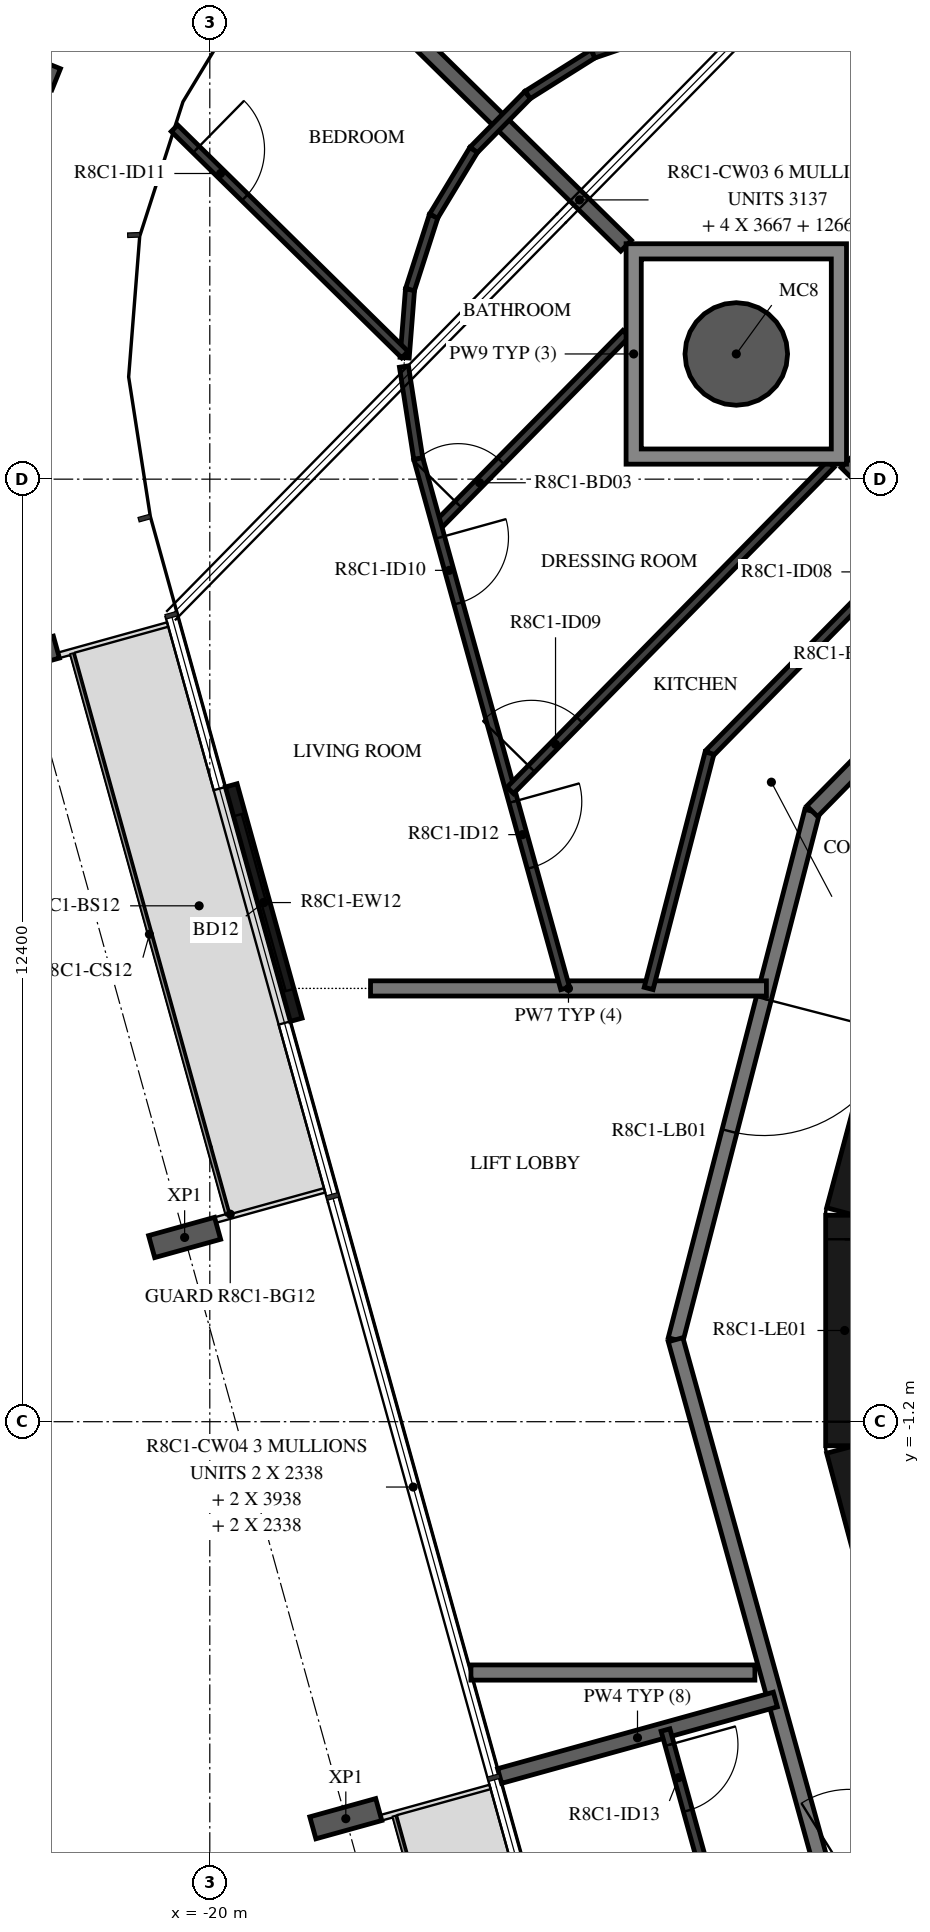
"""IFC4 building model, lengths in metres.
Left out: names, types, materials, properties, quantities, classifications, styles, units other than length and angle.
Written with IfcOpenShell. Run it as: python <this file> out.ifc"""

import sys

from ifc_helpers import new_model, si_unit, direction, frame, frame_2d, origin, origin_2d, place, context, subcontext, project, spatial, polyline, rectangle, hollow_circle, i_section, outline, extrude, element, fill, save


model = new_model("IFC4")
c1 = context("Model", 3, precision=1e-05, world=origin(), true_north=direction((0.0, 1.0)))
c2 = subcontext(c1, "Body", "Model", "MODEL_VIEW")
j1 = project(units=[si_unit("LENGTHUNIT", "METRE"), si_unit("PLANEANGLEUNIT", "RADIAN")], contexts=[c1])
p1 = place(None, origin())
s1 = spatial("IfcSite", under=j1, at=p1, CompositionType="ELEMENT")
p2 = place(p1, origin())
s2 = spatial("IfcBuilding", under=s1, at=p2, CompositionType="ELEMENT")
p3 = place(p2, frame((0.0, 0.0, 322.7)))
s3 = spatial("IfcBuildingStorey", under=s2, at=p3, CompositionType="ELEMENT", Elevation=322.7)
p4 = place(p3, frame((-13.073, 12.847, -0.38), z_axis=(0.0, 0.0, 1.0), x_axis=(1.0, 0.0, 0.0)))
e1 = element("IfcColumn", 1, at=p4, inside=s3, PredefinedType="COLUMN", context=c2, shape_type="SweptSolid", body=[
    extrude(hollow_circle(Radius=0.675, WallThickness=0.03, at=origin_2d()), origin(), (0.0, 0.0, 1.0), 2.616),
])
for number, where, z_axis, x_axis in (
    (2, (-22.438, 16.629, -0.38), (0.0, 0.0, 1.0), (0.374, 0.927, 0.0)),
    (3, (-22.452, 8.87, -0.38), (0.0, 0.0, 1.0), (-0.267, 0.964, 0.0)),
    (4, (-20.331, 1.224, -0.38), (0.0, 0.0, 1.0), (-0.267, 0.964, 0.0)),
    (5, (-18.211, -6.423, -0.38), (0.0, 0.0, 1.0), (-0.267, 0.964, 0.0)),
):
    element("IfcColumn", number, at=place(p3, frame(where, z_axis=z_axis, x_axis=x_axis)), inside=s3, PredefinedType="COLUMN", context=c2, shape_type="SweptSolid", body=[
        extrude(i_section(OverallWidth=0.3, OverallDepth=0.9, WebThickness=0.019, FlangeThickness=0.035, FilletRadius=0.03, at=origin_2d()), origin(), (0.0, 0.0, 1.0), 2.616),
    ])
p5 = place(p3, frame((-19.718, 7.171, 0.0), z_axis=(0.0, 0.0, 1.0), x_axis=(0.267266077957, -0.963622770369, 0.0)))
e6 = element("IfcWall", 6, at=p5, inside=s3, PredefinedType="STANDARD", context=c2, shape_type="SweptSolid", body=[
    extrude(rectangle(XDim=3.2, YDim=0.16, at=frame_2d((1.6, 0.0))), origin(), (0.0, 0.0, 1.0), 3.05),
])
p6 = place(p5, frame((0.4, 0.0, 0.0)))
e7 = element("IfcOpeningElement", 7, at=p6, cuts=e6, PredefinedType="OPENING", context=c2, shape_type="SweptSolid", body=[
    extrude(rectangle(XDim=2.4, YDim=2.4, at=frame_2d((1.2, 1.2))), frame((0.0, 0.09, 0.0), z_axis=(0.0, -1.0, 0.0), x_axis=(1.0, 0.0, 0.0)), (0.0, 0.0, 1.0), 0.18),
])
p7 = place(p3, frame((-10.858, 4.479, 0.0), z_axis=(0.0, 0.0, 1.0), x_axis=(-0.258734743916, -0.965948410781, 0.0)))
e8 = element("IfcWall", 8, at=p7, inside=s3, PredefinedType="SHEAR", context=c2, shape_type="SweptSolid", body=[
    extrude(rectangle(XDim=3.033, YDim=0.5, at=frame_2d((1.516, 0.0))), origin(), (0.0, 0.0, 1.0), 3.05),
])
p8 = place(p3, frame((-11.647, 1.516, 0.0), z_axis=(0.0, 0.0, 1.0), x_axis=(0.0, -1.0, 0.0)))
e9 = element("IfcWall", 9, at=p8, inside=s3, PredefinedType="SHEAR", context=c2, shape_type="SweptSolid", body=[
    extrude(rectangle(XDim=3.033, YDim=0.5, at=frame_2d((1.516, 0.0))), origin(), (0.0, 0.0, 1.0), 3.05),
])
p9 = place(p8, frame((0.316, 0.0, 0.0)))
e10 = element("IfcOpeningElement", 10, at=p9, cuts=e9, PredefinedType="OPENING", context=c2, shape_type="SweptSolid", body=[
    extrude(rectangle(XDim=2.4, YDim=2.1, at=frame_2d((1.2, 1.05))), frame((0.0, 0.26, 0.0), z_axis=(0.0, -1.0, 0.0), x_axis=(1.0, 0.0, 0.0)), (0.0, 0.0, 1.0), 0.52),
])
p10 = place(p3, frame((-11.643, -1.55, 0.0), z_axis=(0.0, 0.0, 1.0), x_axis=(0.258734743916, -0.965948410781, 0.0)))
e11 = element("IfcWall", 11, at=p10, inside=s3, PredefinedType="SHEAR", context=c2, shape_type="SweptSolid", body=[
    extrude(rectangle(XDim=3.033, YDim=0.5, at=frame_2d((1.516, 0.0))), origin(), (0.0, 0.0, 1.0), 3.05),
])
p11 = place(p10, frame((1.066, 0.0, 0.0)))
e12 = element("IfcOpeningElement", 12, at=p11, cuts=e11, PredefinedType="OPENING", context=c2, shape_type="SweptSolid", body=[
    extrude(rectangle(XDim=0.9, YDim=2.1, at=frame_2d((0.45, 1.05))), frame((0.0, 0.26, 0.0), z_axis=(0.0, -1.0, 0.0), x_axis=(1.0, 0.0, 0.0)), (0.0, 0.0, 1.0), 0.52),
])
p12 = place(p3, frame((-11.687, -7.303, 0.0), z_axis=(0.0, 0.0, 1.0), x_axis=(0.848064094072, 0.529893661357, 0.0)))
e13 = element("IfcWall", 13, at=p12, inside=s3, PredefinedType="PARTITIONING", context=c2, shape_type="SweptSolid", body=[
    extrude(rectangle(XDim=1.876, YDim=0.12, at=frame_2d((0.938, 0.0))), origin(), (0.0, 0.0, 1.0), 3.05),
])
p13 = place(p12, frame((0.125, 0.0, 0.0)))
e14 = element("IfcOpeningElement", 14, at=p13, cuts=e13, PredefinedType="OPENING", context=c2, shape_type="SweptSolid", body=[
    extrude(rectangle(XDim=1.2, YDim=2.1, at=frame_2d((0.6, 1.05))), frame((0.0, 0.07, 0.0), z_axis=(0.0, -1.0, 0.0), x_axis=(1.0, 0.0, 0.0)), (0.0, 0.0, 1.0), 0.14),
])
p14 = place(p3, frame((-12.074, 6.831, 0.0), z_axis=(0.0, 0.0, 1.0), x_axis=(-0.250391063186, -0.968144780225, 0.0)))
e15 = element("IfcWall", 15, at=p14, inside=s3, PredefinedType="STANDARD", context=c2, shape_type="SweptSolid", body=[
    extrude(rectangle(XDim=7.181, YDim=0.2, at=frame_2d((3.591, 0.0))), origin(), (0.0, 0.0, 1.0), 3.05),
])
p15 = place(p14, frame((2.548, 0.0, 0.0)))
e16 = element("IfcOpeningElement", 16, at=p15, cuts=e15, PredefinedType="OPENING", context=c2, shape_type="SweptSolid", body=[
    extrude(rectangle(XDim=1.8, YDim=2.1, at=frame_2d((0.9, 1.05))), frame((0.0, 0.11, 0.0), z_axis=(0.0, -1.0, 0.0), x_axis=(1.0, 0.0, 0.0)), (0.0, 0.0, 1.0), 0.22),
])
p16 = place(p3, frame((-13.872, -0.121, 0.0), z_axis=(0.0, 0.0, 1.0), x_axis=(0.267254575108, -0.963625960674, 0.0)))
e17 = element("IfcWall", 17, at=p16, inside=s3, PredefinedType="STANDARD", context=c2, shape_type="SweptSolid", body=[
    extrude(rectangle(XDim=7.181, YDim=0.2, at=frame_2d((3.591, 0.0))), origin(), (0.0, 0.0, 1.0), 3.05),
])
p17 = place(p3, frame((-7.041, 11.953, 0.0), z_axis=(0.0, 0.0, 1.0), x_axis=(-0.70090916255, -0.713250549143, 0.0)))
e18 = element("IfcWall", 18, at=p17, inside=s3, PredefinedType="STANDARD", context=c2, shape_type="SweptSolid", body=[
    extrude(rectangle(XDim=7.181, YDim=0.2, at=frame_2d((3.59, 0.0))), origin(), (0.0, 0.0, 1.0), 3.05),
])
p18 = place(p17, frame((2.39, 0.0, 0.0)))
e19 = element("IfcOpeningElement", 19, at=p18, cuts=e18, PredefinedType="OPENING", context=c2, shape_type="SweptSolid", body=[
    extrude(rectangle(XDim=1.0, YDim=2.1, at=frame_2d((0.5, 1.05))), frame((0.0, 0.11, 0.0), z_axis=(0.0, -1.0, 0.0), x_axis=(1.0, 0.0, 0.0)), (0.0, 0.0, 1.0), 0.22),
])
p19 = place(p17, frame((3.791, 0.0, 0.0)))
e20 = element("IfcOpeningElement", 20, at=p19, cuts=e18, PredefinedType="OPENING", context=c2, shape_type="SweptSolid", body=[
    extrude(rectangle(XDim=1.0, YDim=2.1, at=frame_2d((0.5, 1.05))), frame((0.0, 0.11, 0.0), z_axis=(0.0, -1.0, 0.0), x_axis=(1.0, 0.0, 0.0)), (0.0, 0.0, 1.0), 0.22),
])
p20 = place(p3, frame((-12.677, 4.5, 0.0), z_axis=(0.0, 0.0, 1.0), x_axis=(-1.0, 0.0, 0.0)))
e21 = element("IfcWall", 21, at=p20, inside=s3, PredefinedType="STANDARD", context=c2, shape_type="SweptSolid", body=[
    extrude(rectangle(XDim=5.208, YDim=0.2, at=frame_2d((2.604, 0.0))), origin(), (0.0, 0.0, 1.0), 3.05),
])
p21 = place(p3, frame((-16.564, -4.5, 0.0), z_axis=(0.0, 0.0, 1.0), x_axis=(1.0, 0.0, 0.0)))
e22 = element("IfcWall", 22, at=p21, inside=s3, PredefinedType="STANDARD", context=c2, shape_type="SweptSolid", body=[
    extrude(rectangle(XDim=3.736, YDim=0.2, at=frame_2d((1.868, 0.0))), origin(), (0.0, 0.0, 1.0), 3.05),
])
p22 = place(p3, frame((-11.623, 11.422, 0.0), z_axis=(0.0, 0.0, 1.0), x_axis=(0.713233657229, -0.700926351478, 0.0)))
e23 = element("IfcWall", 23, at=p22, inside=s3, PredefinedType="STANDARD", context=c2, shape_type="SweptSolid", body=[
    extrude(rectangle(XDim=2.896, YDim=0.2, at=frame_2d((1.448, 0.0))), origin(), (0.0, 0.0, 1.0), 3.05),
])
p23 = place(p3, frame((-18.741, 18.417, 0.0), z_axis=(0.0, 0.0, 1.0), x_axis=(0.713252414586, -0.700907264256, 0.0)))
e24 = element("IfcWall", 24, at=p23, inside=s3, PredefinedType="STANDARD", context=c2, shape_type="SweptSolid", body=[
    extrude(rectangle(XDim=5.913, YDim=0.2, at=frame_2d((2.957, 0.0))), origin(), (0.0, 0.0, 1.0), 3.05),
])
p24 = place(p3, frame((-16.187, -5.862, 0.0), z_axis=(0.0, 0.0, 1.0), x_axis=(0.963631166683, 0.267235803358, 0.0)))
e25 = element("IfcWall", 25, at=p24, inside=s3, PredefinedType="STANDARD", context=c2, shape_type="SweptSolid", body=[
    extrude(rectangle(XDim=3.765, YDim=0.2, at=frame_2d((1.882, 0.0))), origin(), (0.0, 0.0, 1.0), 3.05),
])
p25 = place(p3, frame((-8.413, 12.698, 0.0), z_axis=(0.0, 0.0, 1.0), x_axis=(-0.700901588882, -0.713257991686, 0.0)))
e26 = element("IfcWall", 26, at=p25, inside=s3, PredefinedType="PARTITIONING", context=c2, shape_type="SweptSolid", body=[
    extrude(rectangle(XDim=7.153, YDim=0.12, at=frame_2d((3.576, 0.0))), origin(), (0.0, 0.0, 1.0), 3.05),
])
p26 = place(p25, frame((3.36, 0.0, 0.0)))
e27 = element("IfcOpeningElement", 27, at=p26, cuts=e26, PredefinedType="OPENING", context=c2, shape_type="SweptSolid", body=[
    extrude(rectangle(XDim=0.9, YDim=2.1, at=frame_2d((0.45, 1.05))), frame((0.0, 0.07, 0.0), z_axis=(0.0, -1.0, 0.0), x_axis=(1.0, 0.0, 0.0)), (0.0, 0.0, 1.0), 0.14),
])
p27 = place(p3, frame((-11.769, 17.054, 0.0), z_axis=(0.0, 0.0, 1.0), x_axis=(0.968146475492, -0.250384508293, 0.0)))
e28 = element("IfcWall", 28, at=p27, inside=s3, PredefinedType="PARTITIONING", context=c2, shape_type="SweptSolid", body=[
    extrude(rectangle(XDim=9.359, YDim=0.12, at=frame_2d((4.679, 0.0))), origin(), (0.0, 0.0, 1.0), 3.05),
])
p28 = place(p27, frame((1.276, 0.0, 0.0)))
e29 = element("IfcOpeningElement", 29, at=p28, cuts=e28, PredefinedType="OPENING", context=c2, shape_type="SweptSolid", body=[
    extrude(rectangle(XDim=0.9, YDim=2.1, at=frame_2d((0.45, 1.05))), frame((0.0, 0.07, 0.0), z_axis=(0.0, -1.0, 0.0), x_axis=(1.0, 0.0, 0.0)), (0.0, 0.0, 1.0), 0.14),
])
for number, where, z_axis, x_axis in (
    (30, (-16.529, 15.531, 0.0), (0.0, 0.0, 1.0), (0.701, 0.713, 0.0)),
    (31, (-15.817, 16.256, 0.0), (0.0, 0.0, 1.0), (0.847, 0.532, 0.0)),
    (32, (-14.957, 16.796, 0.0), (0.0, 0.0, 1.0), (0.946, 0.323, 0.0)),
):
    element("IfcWall", number, at=place(p3, frame(where, z_axis=z_axis, x_axis=x_axis)), inside=s3, PredefinedType="PARTITIONING", context=c2, shape_type="SweptSolid", body=[
        extrude(rectangle(XDim=1.016, YDim=0.12, at=frame_2d((0.508, 0.0))), origin(), (0.0, 0.0, 1.0), 3.05),
    ])
p29 = place(p3, frame((-13.426, 7.596, 0.0), z_axis=(0.0, 0.0, 1.0), x_axis=(-0.250342106136, -0.968157440655, 0.0)))
e33 = element("IfcWall", 33, at=p29, inside=s3, PredefinedType="PARTITIONING", context=c2, shape_type="SweptSolid", body=[
    extrude(rectangle(XDim=3.198, YDim=0.12, at=frame_2d((1.599, 0.0))), origin(), (0.0, 0.0, 1.0), 3.05),
])
p30 = place(p3, frame((-17.437, 12.798, 0.0), z_axis=(0.0, 0.0, 1.0), x_axis=(0.078482315782, 0.996915506003, 0.0)))
e34 = element("IfcWall", 34, at=p30, inside=s3, PredefinedType="PARTITIONING", context=c2, shape_type="SweptSolid", body=[
    extrude(rectangle(XDim=0.899, YDim=0.12, at=frame_2d((0.449, 0.0))), origin(), (0.0, 0.0, 1.0), 3.05),
])
for number, where, z_axis, x_axis in (
    (35, (-17.366, 13.695, 0.0), (0.0, 0.0, 1.0), (0.306, 0.952, 0.0)),
    (36, (-17.055, 14.662, 0.0), (0.0, 0.0, 1.0), (0.517, 0.856, 0.0)),
):
    element("IfcWall", number, at=place(p3, frame(where, z_axis=z_axis, x_axis=x_axis)), inside=s3, PredefinedType="PARTITIONING", context=c2, shape_type="SweptSolid", body=[
        extrude(rectangle(XDim=1.016, YDim=0.12, at=frame_2d((0.508, 0.0))), origin(), (0.0, 0.0, 1.0), 3.05),
    ])
p31 = place(p3, frame((-20.465, 15.817, 0.0), z_axis=(0.0, 0.0, 1.0), x_axis=(0.713254811643, -0.700904824971, 0.0)))
e37 = element("IfcWall", 37, at=p31, inside=s3, PredefinedType="PARTITIONING", context=c2, shape_type="SweptSolid", body=[
    extrude(rectangle(XDim=4.25, YDim=0.12, at=frame_2d((2.125, 0.0))), origin(), (0.0, 0.0, 1.0), 3.05),
])
p32 = place(p31, frame((0.4, 0.0, 0.0)))
e38 = element("IfcOpeningElement", 38, at=p32, cuts=e37, PredefinedType="OPENING", context=c2, shape_type="SweptSolid", body=[
    extrude(rectangle(XDim=0.9, YDim=2.1, at=frame_2d((0.45, 1.05))), frame((0.0, 0.07, 0.0), z_axis=(0.0, -1.0, 0.0), x_axis=(1.0, 0.0, 0.0)), (0.0, 0.0, 1.0), 0.14),
])
p33 = place(p3, frame((-17.011, 10.582, 0.0), z_axis=(0.0, 0.0, 1.0), x_axis=(0.700924288011, 0.713235685083, 0.0)))
e39 = element("IfcWall", 39, at=p33, inside=s3, PredefinedType="PARTITIONING", context=c2, shape_type="SweptSolid", body=[
    extrude(rectangle(XDim=3.55, YDim=0.12, at=frame_2d((1.775, 0.0))), origin(), (0.0, 0.0, 1.0), 3.05),
])
p34 = place(p33, frame((0.4, 0.0, 0.0)))
e40 = element("IfcOpeningElement", 40, at=p34, cuts=e39, PredefinedType="OPENING", context=c2, shape_type="SweptSolid", body=[
    extrude(rectangle(XDim=0.8, YDim=2.1, at=frame_2d((0.4, 1.05))), frame((0.0, 0.07, 0.0), z_axis=(0.0, -1.0, 0.0), x_axis=(1.0, 0.0, 0.0)), (0.0, 0.0, 1.0), 0.14),
])
p35 = place(p3, frame((-17.446, 12.682, 0.0), z_axis=(0.0, 0.0, 1.0), x_axis=(0.153612025092, -0.988131239131, 0.0)))
e41 = element("IfcWall", 41, at=p35, inside=s3, PredefinedType="PARTITIONING", context=c2, shape_type="SweptSolid", body=[
    extrude(rectangle(XDim=1.227, YDim=0.12, at=frame_2d((0.614, 0.0))), origin(), (0.0, 0.0, 1.0), 3.05),
])
p36 = place(p3, frame((-17.257, 11.469, 0.0), z_axis=(0.0, 0.0, 1.0), x_axis=(0.267222501114, -0.963634855585, 0.0)))
e42 = element("IfcWall", 42, at=p36, inside=s3, PredefinedType="PARTITIONING", context=c2, shape_type="SweptSolid", body=[
    extrude(rectangle(XDim=7.232, YDim=0.12, at=frame_2d((3.616, 0.0))), origin(), (0.0, 0.0, 1.0), 3.05),
])
p37 = place(p36, frame((1.074, 0.0, 0.0)))
e43 = element("IfcOpeningElement", 43, at=p37, cuts=e42, PredefinedType="OPENING", context=c2, shape_type="SweptSolid", body=[
    extrude(rectangle(XDim=0.9, YDim=2.1, at=frame_2d((0.45, 1.05))), frame((0.0, 0.07, 0.0), z_axis=(0.0, -1.0, 0.0), x_axis=(1.0, 0.0, 0.0)), (0.0, 0.0, 1.0), 0.14),
])
p38 = place(p36, frame((4.682, 0.0, 0.0)))
e44 = element("IfcOpeningElement", 44, at=p38, cuts=e42, PredefinedType="OPENING", context=c2, shape_type="SweptSolid", body=[
    extrude(rectangle(XDim=0.9, YDim=2.1, at=frame_2d((0.45, 1.05))), frame((0.0, 0.07, 0.0), z_axis=(0.0, -1.0, 0.0), x_axis=(1.0, 0.0, 0.0)), (0.0, 0.0, 1.0), 0.14),
])
p39 = place(p3, frame((-16.047, 7.105, 0.0), z_axis=(0.0, 0.0, 1.0), x_axis=(0.700892382646, 0.713267038316, 0.0)))
e45 = element("IfcWall", 45, at=p39, inside=s3, PredefinedType="PARTITIONING", context=c2, shape_type="SweptSolid", body=[
    extrude(rectangle(XDim=6.017, YDim=0.12, at=frame_2d((3.009, 0.0))), origin(), (0.0, 0.0, 1.0), 3.05),
])
p40 = place(p39, frame((0.4, 0.0, 0.0)))
e46 = element("IfcOpeningElement", 46, at=p40, cuts=e45, PredefinedType="OPENING", context=c2, shape_type="SweptSolid", body=[
    extrude(rectangle(XDim=0.9, YDim=2.1, at=frame_2d((0.45, 1.05))), frame((0.0, 0.07, 0.0), z_axis=(0.0, -1.0, 0.0), x_axis=(1.0, 0.0, 0.0)), (0.0, 0.0, 1.0), 0.14),
])
p41 = place(p3, frame((-14.005, -5.256, 0.0), z_axis=(0.0, 0.0, 1.0), x_axis=(0.267200500487, -0.963640956238, 0.0)))
e47 = element("IfcWall", 47, at=p41, inside=s3, PredefinedType="PARTITIONING", context=c2, shape_type="SweptSolid", body=[
    extrude(rectangle(XDim=2.67, YDim=0.12, at=frame_2d((1.335, 0.0))), origin(), (0.0, 0.0, 1.0), 3.05),
])
p42 = place(p41, frame((0.2, 0.0, 0.0)))
e48 = element("IfcOpeningElement", 48, at=p42, cuts=e47, PredefinedType="OPENING", context=c2, shape_type="SweptSolid", body=[
    extrude(rectangle(XDim=0.9, YDim=2.1, at=frame_2d((0.45, 1.05))), frame((0.0, 0.07, 0.0), z_axis=(0.0, -1.0, 0.0), x_axis=(1.0, 0.0, 0.0)), (0.0, 0.0, 1.0), 0.14),
])
p43 = place(p3, origin())
e49 = element("IfcWall", 49, at=p43, inside=s3, PredefinedType="STANDARD", context=c2, shape_type="SweptSolid", body=[
    extrude(outline(polyline([(-11.623, 14.297), (-11.623, 11.397), (-14.523, 11.397), (-14.523, 14.297), (-11.623, 14.297)]), holes=[polyline([(-14.323, 11.597), (-11.823, 11.597), (-11.823, 14.097), (-14.323, 14.097), (-14.323, 11.597)])]), origin(), (0.0, 0.0, 1.0), 3.05),
])
p44 = place(p6, origin())
e50 = element("IfcDoor", 50, at=p44, inside=s3, OperationType="DOUBLE_DOOR_SLIDING", PredefinedType="DOOR", context=c2, shape_type="SweptSolid", body=[
    extrude(rectangle(XDim=2.4, YDim=2.4, at=frame_2d((1.2, 1.2))), frame((0.0, 0.025, 0.0), z_axis=(0.0, -1.0, 0.0), x_axis=(1.0, 0.0, 0.0)), (0.0, 0.0, 1.0), 0.05),
])
fill(e7, e50)
p45 = place(p9, origin())
e51 = element("IfcDoor", 51, at=p45, inside=s3, OperationType="DOUBLE_DOOR_SINGLE_SWING", PredefinedType="DOOR", context=c2, shape_type="SweptSolid", body=[
    extrude(rectangle(XDim=2.4, YDim=2.1, at=frame_2d((1.2, 1.05))), frame((0.0, 0.025, 0.0), z_axis=(0.0, -1.0, 0.0), x_axis=(1.0, 0.0, 0.0)), (0.0, 0.0, 1.0), 0.05),
])
fill(e10, e51)
p46 = place(p40, origin())
e52 = element("IfcDoor", 52, at=p46, inside=s3, OperationType="SINGLE_SWING_LEFT", PredefinedType="DOOR", context=c2, shape_type="SweptSolid", body=[
    extrude(rectangle(XDim=0.9, YDim=2.1, at=frame_2d((0.45, 1.05))), frame((0.0, 0.025, 0.0), z_axis=(0.0, -1.0, 0.0), x_axis=(1.0, 0.0, 0.0)), (0.0, 0.0, 1.0), 0.05),
])
fill(e46, e52)
p47 = place(p34, origin())
e53 = element("IfcDoor", 53, at=p47, inside=s3, OperationType="SINGLE_SWING_LEFT", PredefinedType="DOOR", context=c2, shape_type="SweptSolid", body=[
    extrude(rectangle(XDim=0.8, YDim=2.1, at=frame_2d((0.4, 1.05))), frame((0.0, 0.025, 0.0), z_axis=(0.0, -1.0, 0.0), x_axis=(1.0, 0.0, 0.0)), (0.0, 0.0, 1.0), 0.05),
])
fill(e40, e53)
p48 = place(p37, origin())
e54 = element("IfcDoor", 54, at=p48, inside=s3, OperationType="SINGLE_SWING_LEFT", PredefinedType="DOOR", context=c2, shape_type="SweptSolid", body=[
    extrude(rectangle(XDim=0.9, YDim=2.1, at=frame_2d((0.45, 1.05))), frame((0.0, 0.025, 0.0), z_axis=(0.0, -1.0, 0.0), x_axis=(1.0, 0.0, 0.0)), (0.0, 0.0, 1.0), 0.05),
])
fill(e43, e54)
p49 = place(p32, origin())
e55 = element("IfcDoor", 55, at=p49, inside=s3, OperationType="SINGLE_SWING_LEFT", PredefinedType="DOOR", context=c2, shape_type="SweptSolid", body=[
    extrude(rectangle(XDim=0.9, YDim=2.1, at=frame_2d((0.45, 1.05))), frame((0.0, 0.025, 0.0), z_axis=(0.0, -1.0, 0.0), x_axis=(1.0, 0.0, 0.0)), (0.0, 0.0, 1.0), 0.05),
])
fill(e38, e55)
p50 = place(p38, origin())
e56 = element("IfcDoor", 56, at=p50, inside=s3, OperationType="SINGLE_SWING_RIGHT", PredefinedType="DOOR", context=c2, shape_type="SweptSolid", body=[
    extrude(rectangle(XDim=0.9, YDim=2.1, at=frame_2d((0.45, 1.05))), frame((0.0, 0.025, 0.0), z_axis=(0.0, -1.0, 0.0), x_axis=(1.0, 0.0, 0.0)), (0.0, 0.0, 1.0), 0.05),
])
fill(e44, e56)
p51 = place(p42, origin())
e57 = element("IfcDoor", 57, at=p51, inside=s3, OperationType="SINGLE_SWING_RIGHT", PredefinedType="DOOR", context=c2, shape_type="SweptSolid", body=[
    extrude(rectangle(XDim=0.9, YDim=2.1, at=frame_2d((0.45, 1.05))), frame((0.0, 0.025, 0.0), z_axis=(0.0, -1.0, 0.0), x_axis=(1.0, 0.0, 0.0)), (0.0, 0.0, 1.0), 0.05),
])
fill(e48, e57)
p52 = place(p13, origin())
e58 = element("IfcDoor", 58, at=p52, inside=s3, OperationType="DOUBLE_DOOR_SINGLE_SWING", PredefinedType="DOOR", context=c2, shape_type="SweptSolid", body=[
    extrude(rectangle(XDim=1.2, YDim=2.1, at=frame_2d((0.6, 1.05))), frame((0.0, 0.025, 0.0), z_axis=(0.0, -1.0, 0.0), x_axis=(1.0, 0.0, 0.0)), (0.0, 0.0, 1.0), 0.05),
])
fill(e14, e58)
p53 = place(p15, origin())
e59 = element("IfcDoor", 59, at=p53, inside=s3, OperationType="DOUBLE_DOOR_SINGLE_SWING", PredefinedType="DOOR", context=c2, shape_type="SweptSolid", body=[
    extrude(rectangle(XDim=1.8, YDim=2.1, at=frame_2d((0.9, 1.05))), frame((0.0, 0.025, 0.0), z_axis=(0.0, -1.0, 0.0), x_axis=(1.0, 0.0, 0.0)), (0.0, 0.0, 1.0), 0.05),
])
fill(e16, e59)
save(model, sys.argv[1])
